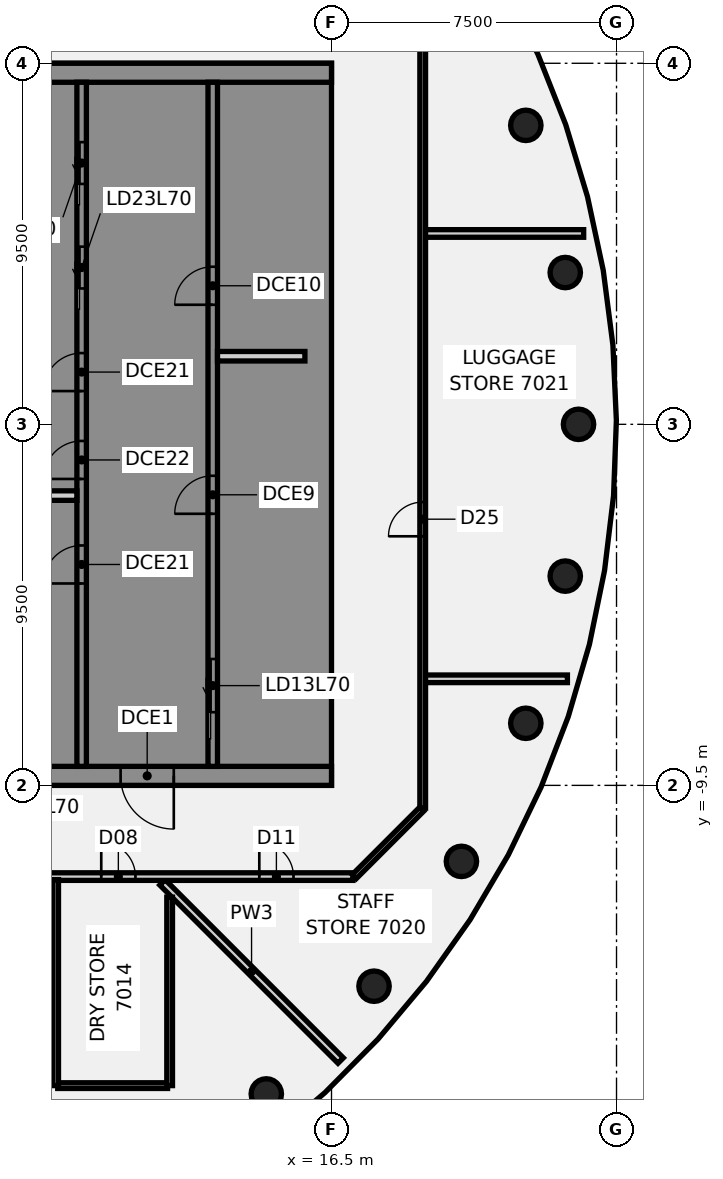
"""IFC4 building model, lengths in metres.
Left out: names, types, materials, properties, quantities, classifications, styles, units other than length and angle.
Written with IfcOpenShell. Run it as: python <this file> out.ifc"""

import sys

from ifc_helpers import new_model, si_unit, direction, frame, frame_2d, origin, origin_2d, place, context, subcontext, project, spatial, polyline, rectangle, circle, outline, extrude, element, fill, save


model = new_model("IFC4")
c1 = context("Model", 3, precision=1e-05, world=origin(), true_north=direction((0.0, 1.0)))
c2 = subcontext(c1, "Body", "Model", "MODEL_VIEW")
j1 = project(units=[si_unit("LENGTHUNIT", "METRE"), si_unit("PLANEANGLEUNIT", "RADIAN")], contexts=[c1])
p1 = place(None, origin())
s1 = spatial("IfcSite", under=j1, at=p1, CompositionType="ELEMENT")
p2 = place(p1, origin())
s2 = spatial("IfcBuilding", under=s1, at=p2, CompositionType="ELEMENT")
p3 = place(p2, frame((0.0, 0.0, 274.8)))
s3 = spatial("IfcBuildingStorey", under=s2, at=p3, CompositionType="ELEMENT", Elevation=274.8)
for number, where, z_axis, x_axis in (
    (1, (23.0, 0.0, -0.14), (0.0, 0.0, 1.0), (1.0, 0.0, 0.0)),
    (2, (22.651, 3.994, -0.14), (0.0, 0.0, 1.0), (1.0, 0.0, 0.0)),
    (3, (21.613, 7.866, -0.14), (0.0, 0.0, 1.0), (1.0, 0.0, 0.0)),
    (4, (14.784, -17.619, -0.14), (0.0, 0.0, 1.0), (1.0, 0.0, 0.0)),
    (5, (17.619, -14.784, -0.14), (0.0, 0.0, 1.0), (1.0, 0.0, 0.0)),
    (6, (19.919, -11.5, -0.14), (0.0, 0.0, 1.0), (1.0, 0.0, 0.0)),
    (7, (21.613, -7.866, -0.14), (0.0, 0.0, 1.0), (1.0, 0.0, 0.0)),
    (8, (22.651, -3.994, -0.14), (0.0, 0.0, 1.0), (1.0, 0.0, 0.0)),
):
    element("IfcColumn", number, at=place(p3, frame(where, z_axis=z_axis, x_axis=x_axis)), inside=s3, PredefinedType="COLUMN", context=c2, shape_type="SweptSolid", body=[
        extrude(circle(Radius=0.4, at=origin_2d()), origin(), (0.0, 0.0, 1.0), 3.56),
    ])
p4 = place(p3, frame((12.052, -12.052, 0.0), z_axis=(0.0, 0.0, 1.0), x_axis=(0.707106781187, -0.707106781187, 0.0)))
e9 = element("IfcWall", 9, at=p4, inside=s3, PredefinedType="PARTITIONING", context=c2, shape_type="SweptSolid", body=[
    extrude(rectangle(XDim=6.631, YDim=0.2, at=frame_2d((3.315, 0.0))), origin(), (0.0, 0.0, 1.0), 2.824),
])
p5 = place(p3, frame((-17.1, -11.9, 0.0), z_axis=(0.0, 0.0, 1.0), x_axis=(1.0, 0.0, 0.0)))
e10 = element("IfcWall", 10, at=p5, inside=s3, PredefinedType="PARTITIONING", context=c2, shape_type="SweptSolid", body=[
    extrude(rectangle(XDim=34.165, YDim=0.2, at=frame_2d((17.083, 0.0))), origin(), (0.0, 0.0, 1.0), 2.824),
])
p6 = place(p5, frame((7.75, 0.0, 0.0)))
e11 = element("IfcOpeningElement", 11, at=p6, cuts=e10, PredefinedType="OPENING", context=c2, shape_type="SweptSolid", body=[
    extrude(rectangle(XDim=0.9, YDim=2.1, at=frame_2d((0.45, 1.05))), frame((0.0, 0.11, 0.0), z_axis=(0.0, -1.0, 0.0), x_axis=(1.0, 0.0, 0.0)), (0.0, 0.0, 1.0), 0.22),
])
p7 = place(p5, frame((27.541, 0.0, 0.0)))
e12 = element("IfcOpeningElement", 12, at=p7, cuts=e10, PredefinedType="OPENING", context=c2, shape_type="SweptSolid", body=[
    extrude(rectangle(XDim=0.9, YDim=2.1, at=frame_2d((0.45, 1.05))), frame((0.0, 0.11, 0.0), z_axis=(0.0, -1.0, 0.0), x_axis=(1.0, 0.0, 0.0)), (0.0, 0.0, 1.0), 0.22),
])
p8 = place(p5, frame((16.809, 0.0, 0.0)))
e13 = element("IfcOpeningElement", 13, at=p8, cuts=e10, PredefinedType="OPENING", context=c2, shape_type="SweptSolid", body=[
    extrude(rectangle(XDim=1.8, YDim=2.1, at=frame_2d((0.9, 1.05))), frame((0.0, 0.11, 0.0), z_axis=(0.0, -1.0, 0.0), x_axis=(1.0, 0.0, 0.0)), (0.0, 0.0, 1.0), 0.22),
])
p9 = place(p5, frame((24.222, 0.0, 0.0)))
e14 = element("IfcOpeningElement", 14, at=p9, cuts=e10, PredefinedType="OPENING", context=c2, shape_type="SweptSolid", body=[
    extrude(rectangle(XDim=0.9, YDim=2.1, at=frame_2d((0.45, 1.05))), frame((0.0, 0.11, 0.0), z_axis=(0.0, -1.0, 0.0), x_axis=(1.0, 0.0, 0.0)), (0.0, 0.0, 1.0), 0.22),
])
p10 = place(p5, frame((31.7, 0.0, 0.0)))
e15 = element("IfcOpeningElement", 15, at=p10, cuts=e10, PredefinedType="OPENING", context=c2, shape_type="SweptSolid", body=[
    extrude(rectangle(XDim=0.9, YDim=2.1, at=frame_2d((0.45, 1.05))), frame((0.0, 0.11, 0.0), z_axis=(0.0, -1.0, 0.0), x_axis=(1.0, 0.0, 0.0)), (0.0, 0.0, 1.0), 0.22),
])
p11 = place(p3, frame((9.296, -17.4, 0.0), z_axis=(0.0, 0.0, 1.0), x_axis=(1.0, 0.0, 0.0)))
e16 = element("IfcWall", 16, at=p11, inside=s3, PredefinedType="PARTITIONING", context=c2, shape_type="SweptSolid", body=[
    extrude(rectangle(XDim=2.89, YDim=0.15, at=frame_2d((1.445, 0.0))), origin(), (0.0, 0.0, 1.0), 2.824),
])
p12 = place(p3, frame((18.955, -6.696, 0.0), z_axis=(0.0, 0.0, 1.0), x_axis=(1.0, 0.0, 0.0)))
e17 = element("IfcWall", 17, at=p12, inside=s3, PredefinedType="PARTITIONING", context=c2, shape_type="SweptSolid", body=[
    extrude(rectangle(XDim=3.753, YDim=0.2, at=frame_2d((1.876, 0.0))), origin(), (0.0, 0.0, 1.0), 2.824),
])
p13 = place(p3, frame((18.955, 5.022, 0.0), z_axis=(0.0, 0.0, 1.0), x_axis=(1.0, 0.0, 0.0)))
e18 = element("IfcWall", 18, at=p13, inside=s3, PredefinedType="PARTITIONING", context=c2, shape_type="SweptSolid", body=[
    extrude(rectangle(XDim=4.181, YDim=0.2, at=frame_2d((2.09, 0.0))), origin(), (0.0, 0.0, 1.0), 2.824),
])
p14 = place(p3, frame((17.1, -11.9, 0.0), z_axis=(0.0, 0.0, 1.0), x_axis=(0.707106781187, 0.707106781187, 0.0)))
e19 = element("IfcWall", 19, at=p14, inside=s3, PredefinedType="PARTITIONING", context=c2, shape_type="SweptSolid", body=[
    extrude(rectangle(XDim=2.505, YDim=0.15, at=frame_2d((1.253, 0.0))), origin(), (0.0, 0.0, 1.0), 2.824),
])
p15 = place(p3, frame((9.241, -17.4, 0.0), z_axis=(0.0, 0.0, 1.0), x_axis=(0.0, 1.0, 0.0)))
e20 = element("IfcWall", 20, at=p15, inside=s3, PredefinedType="PARTITIONING", context=c2, shape_type="SweptSolid", body=[
    extrude(rectangle(XDim=5.42, YDim=0.15, at=frame_2d((2.71, 0.0))), origin(), (0.0, 0.0, 1.0), 2.824),
])
p16 = place(p3, frame((12.241, -17.4, 0.0), z_axis=(0.0, 0.0, 1.0), x_axis=(0.0, 1.0, 0.0)))
e21 = element("IfcWall", 21, at=p16, inside=s3, PredefinedType="PARTITIONING", context=c2, shape_type="SweptSolid", body=[
    extrude(rectangle(XDim=4.959, YDim=0.15, at=frame_2d((2.479, 0.0))), origin(), (0.0, 0.0, 1.0), 2.824),
])
p17 = place(p3, frame((18.9, -10.1, 0.0), z_axis=(0.0, 0.0, 1.0), x_axis=(0.0, 1.0, 0.0)))
e22 = element("IfcWall", 22, at=p17, inside=s3, PredefinedType="PARTITIONING", context=c2, shape_type="SweptSolid", body=[
    extrude(rectangle(XDim=20.2, YDim=0.15, at=frame_2d((10.1, 0.0))), origin(), (0.0, 0.0, 1.0), 2.824),
])
p18 = place(p17, frame((7.154, 0.0, 0.0)))
e23 = element("IfcOpeningElement", 23, at=p18, cuts=e22, PredefinedType="OPENING", context=c2, shape_type="SweptSolid", body=[
    extrude(rectangle(XDim=0.9, YDim=2.1, at=frame_2d((0.45, 1.05))), frame((0.0, 0.085, 0.0), z_axis=(0.0, -1.0, 0.0), x_axis=(1.0, 0.0, 0.0)), (0.0, 0.0, 1.0), 0.17),
])
p19 = place(p3, frame((16.5, -9.25, 0.0), z_axis=(0.0, 0.0, 1.0), x_axis=(-1.0, 0.0, 0.0)))
e24 = element("IfcWall", 24, at=p19, inside=s3, PredefinedType="SHEAR", context=c2, shape_type="SweptSolid", body=[
    extrude(rectangle(XDim=13.0, YDim=0.5, at=frame_2d((6.5, 0.0))), origin(), (0.0, 0.0, 1.0), 3.42),
])
p20 = place(p19, frame((4.15, 0.0, 0.0)))
e25 = element("IfcOpeningElement", 25, at=p20, cuts=e24, PredefinedType="OPENING", context=c2, shape_type="SweptSolid", body=[
    extrude(rectangle(XDim=1.4, YDim=2.1, at=frame_2d((0.7, 1.05))), frame((0.0, 0.26, 0.0), z_axis=(0.0, -1.0, 0.0), x_axis=(1.0, 0.0, 0.0)), (0.0, 0.0, 1.0), 0.52),
])
p21 = place(p19, frame((10.125, 0.0, 0.0)))
e26 = element("IfcOpeningElement", 26, at=p21, cuts=e24, PredefinedType="OPENING", context=c2, shape_type="SweptSolid", body=[
    extrude(rectangle(XDim=1.4, YDim=2.1, at=frame_2d((0.7, 1.05))), frame((0.0, 0.26, 0.0), z_axis=(0.0, -1.0, 0.0), x_axis=(1.0, 0.0, 0.0)), (0.0, 0.0, 1.0), 0.52),
])
p22 = place(p3, origin())
e27 = element("IfcWall", 27, at=p22, inside=s3, PredefinedType="SHEAR", context=c2, shape_type="SweptSolid", body=[
    extrude(outline(polyline([(13.5, -8.125), (13.5, -9.0), (16.0, -9.0), (16.5, -9.0), (16.5, 9.0), (16.0, 9.0), (13.5, 9.0), (13.5, 8.125), (16.0, 8.125), (16.0, 5.625), (13.5, 5.625), (13.5, 5.375), (16.0, 5.375), (16.0, -5.375), (13.5, -5.375), (13.5, -5.625), (16.0, -5.625), (16.0, -8.125), (13.5, -8.125)])), origin(), (0.0, 0.0, 1.0), 3.42),
])
p23 = place(p3, frame((16.5, 9.25, 0.0), z_axis=(0.0, 0.0, 1.0), x_axis=(-1.0, 0.0, 0.0)))
e28 = element("IfcWall", 28, at=p23, inside=s3, PredefinedType="SHEAR", context=c2, shape_type="SweptSolid", body=[
    extrude(rectangle(XDim=13.0, YDim=0.5, at=frame_2d((6.5, 0.0))), origin(), (0.0, 0.0, 1.0), 3.42),
])
p24 = place(p3, origin())
e29 = element("IfcWall", 29, at=p24, inside=s3, PredefinedType="SHEAR", context=c2, shape_type="SweptSolid", body=[
    extrude(outline(polyline([(9.8, -5.375), (7.5, -5.375), (7.5, 2.625), (9.8, 2.625), (9.8, 2.875), (7.5, 2.875), (7.5, 5.375), (9.8, 5.375), (9.8, 5.625), (7.5, 5.625), (7.5, 8.125), (9.8, 8.125), (9.8, 9.0), (7.5, 9.0), (7.25, 9.0), (7.25, -5.625), (7.5, -5.625), (9.8, -5.625), (9.8, -5.375)])), origin(), (0.0, 0.0, 1.0), 3.42),
])
p25 = place(p3, origin())
e30 = element("IfcWall", 30, at=p25, inside=s3, PredefinedType="SHEAR", context=c2, shape_type="SweptSolid", body=[
    extrude(outline(polyline([(7.5, -8.125), (7.5, -9.0), (9.8, -9.0), (9.8, -8.125), (9.8, -5.625), (9.55, -5.625), (9.55, -8.125), (7.5, -8.125)])), origin(), (0.0, 0.0, 1.0), 3.42),
])
p26 = place(p3, frame((13.375, -9.0, 0.0), z_axis=(0.0, 0.0, 1.0), x_axis=(0.0, 1.0, 0.0)))
e31 = element("IfcWall", 31, at=p26, inside=s3, PredefinedType="SHEAR", context=c2, shape_type="SweptSolid", body=[
    extrude(rectangle(XDim=18.0, YDim=0.25, at=frame_2d((9.0, 0.0))), origin(), (0.0, 0.0, 1.0), 3.42),
])
p27 = place(p26, frame((1.425, 0.0, 0.0)))
e32 = element("IfcOpeningElement", 32, at=p27, cuts=e31, PredefinedType="OPENING", context=c2, shape_type="SweptSolid", body=[
    extrude(rectangle(XDim=1.4, YDim=2.1, at=frame_2d((0.7, 1.05))), frame((0.0, 0.135, 0.0), z_axis=(0.0, -1.0, 0.0), x_axis=(1.0, 0.0, 0.0)), (0.0, 0.0, 1.0), 0.27),
])
p28 = place(p26, frame((6.646, 0.0, 0.0)))
e33 = element("IfcOpeningElement", 33, at=p28, cuts=e31, PredefinedType="OPENING", context=c2, shape_type="SweptSolid", body=[
    extrude(rectangle(XDim=1.0, YDim=2.1, at=frame_2d((0.5, 1.05))), frame((0.0, 0.135, 0.0), z_axis=(0.0, -1.0, 0.0), x_axis=(1.0, 0.0, 0.0)), (0.0, 0.0, 1.0), 0.27),
])
p29 = place(p26, frame((12.146, 0.0, 0.0)))
e34 = element("IfcOpeningElement", 34, at=p29, cuts=e31, PredefinedType="OPENING", context=c2, shape_type="SweptSolid", body=[
    extrude(rectangle(XDim=1.0, YDim=2.1, at=frame_2d((0.5, 1.05))), frame((0.0, 0.135, 0.0), z_axis=(0.0, -1.0, 0.0), x_axis=(1.0, 0.0, 0.0)), (0.0, 0.0, 1.0), 0.27),
])
p30 = place(p3, frame((9.925, -9.0, 0.0), z_axis=(0.0, 0.0, 1.0), x_axis=(0.0, 1.0, 0.0)))
e35 = element("IfcWall", 35, at=p30, inside=s3, PredefinedType="SHEAR", context=c2, shape_type="SweptSolid", body=[
    extrude(rectangle(XDim=18.0, YDim=0.25, at=frame_2d((9.0, 0.0))), origin(), (0.0, 0.0, 1.0), 3.42),
])
p31 = place(p30, frame((12.575, 0.0, 0.0)))
e36 = element("IfcOpeningElement", 36, at=p31, cuts=e35, PredefinedType="OPENING", context=c2, shape_type="SweptSolid", body=[
    extrude(rectangle(XDim=1.1, YDim=2.1, at=frame_2d((0.55, 1.05))), frame((0.0, 0.135, 0.0), z_axis=(0.0, -1.0, 0.0), x_axis=(1.0, 0.0, 0.0)), (0.0, 0.0, 1.0), 0.27),
])
p32 = place(p30, frame((15.325, 0.0, 0.0)))
e37 = element("IfcOpeningElement", 37, at=p32, cuts=e35, PredefinedType="OPENING", context=c2, shape_type="SweptSolid", body=[
    extrude(rectangle(XDim=1.1, YDim=2.1, at=frame_2d((0.55, 1.05))), frame((0.0, 0.135, 0.0), z_axis=(0.0, -1.0, 0.0), x_axis=(1.0, 0.0, 0.0)), (0.0, 0.0, 1.0), 0.27),
])
p33 = place(p30, frame((4.812, 0.0, 0.0)))
e38 = element("IfcOpeningElement", 38, at=p33, cuts=e35, PredefinedType="OPENING", context=c2, shape_type="SweptSolid", body=[
    extrude(rectangle(XDim=1.0, YDim=2.1, at=frame_2d((0.5, 1.05))), frame((0.0, 0.135, 0.0), z_axis=(0.0, -1.0, 0.0), x_axis=(1.0, 0.0, 0.0)), (0.0, 0.0, 1.0), 0.27),
])
p34 = place(p30, frame((7.562, 0.0, 0.0)))
e39 = element("IfcOpeningElement", 39, at=p34, cuts=e35, PredefinedType="OPENING", context=c2, shape_type="SweptSolid", body=[
    extrude(rectangle(XDim=1.0, YDim=2.1, at=frame_2d((0.5, 1.05))), frame((0.0, 0.135, 0.0), z_axis=(0.0, -1.0, 0.0), x_axis=(1.0, 0.0, 0.0)), (0.0, 0.0, 1.0), 0.27),
])
p35 = place(p30, frame((9.875, 0.0, 0.0)))
e40 = element("IfcOpeningElement", 40, at=p35, cuts=e35, PredefinedType="OPENING", context=c2, shape_type="SweptSolid", body=[
    extrude(rectangle(XDim=1.0, YDim=2.1, at=frame_2d((0.5, 1.05))), frame((0.0, 0.135, 0.0), z_axis=(0.0, -1.0, 0.0), x_axis=(1.0, 0.0, 0.0)), (0.0, 0.0, 1.0), 0.27),
])
for number, where, z_axis, x_axis in (
    (41, (15.8, 1.792, 0.0), (0.0, 0.0, 1.0), (-1.0, 0.0, 0.0)),
    (42, (9.8, -1.875, 0.0), (0.0, 0.0, 1.0), (-1.0, 0.0, 0.0)),
):
    element("IfcWall", number, at=place(p3, frame(where, z_axis=z_axis, x_axis=x_axis)), inside=s3, PredefinedType="PARTITIONING", context=c2, shape_type="SweptSolid", body=[
        extrude(rectangle(XDim=2.3, YDim=0.25, at=frame_2d((1.15, 0.0))), origin(), (0.0, 0.0, 1.0), 3.42),
    ])
p36 = place(p7, frame((0.9, 0.0, 0.0), z_axis=(0.0, 0.0, 1.0), x_axis=(-1.0, 0.0, 0.0)))
e43 = element("IfcDoor", 43, at=p36, inside=s3, OperationType="SINGLE_SWING_RIGHT", PredefinedType="DOOR", context=c2, shape_type="SweptSolid", body=[
    extrude(rectangle(XDim=0.9, YDim=2.1, at=frame_2d((0.45, 1.05))), frame((0.0, 0.025, 0.0), z_axis=(0.0, -1.0, 0.0), x_axis=(1.0, 0.0, 0.0)), (0.0, 0.0, 1.0), 0.05),
])
fill(e12, e43)
p37 = place(p10, frame((0.9, 0.0, 0.0), z_axis=(0.0, 0.0, 1.0), x_axis=(-1.0, 0.0, 0.0)))
e44 = element("IfcDoor", 44, at=p37, inside=s3, OperationType="SINGLE_SWING_RIGHT", PredefinedType="DOOR", context=c2, shape_type="SweptSolid", body=[
    extrude(rectangle(XDim=0.9, YDim=2.1, at=frame_2d((0.45, 1.05))), frame((0.0, 0.025, 0.0), z_axis=(0.0, -1.0, 0.0), x_axis=(1.0, 0.0, 0.0)), (0.0, 0.0, 1.0), 0.05),
])
fill(e15, e44)
p38 = place(p18, frame((0.9, 0.0, 0.0), z_axis=(0.0, 0.0, 1.0), x_axis=(-1.0, 0.0, 0.0)))
e45 = element("IfcDoor", 45, at=p38, inside=s3, OperationType="SINGLE_SWING_LEFT", PredefinedType="DOOR", context=c2, shape_type="SweptSolid", body=[
    extrude(rectangle(XDim=0.9, YDim=2.1, at=frame_2d((0.45, 1.05))), frame((0.0, 0.025, 0.0), z_axis=(0.0, -1.0, 0.0), x_axis=(1.0, 0.0, 0.0)), (0.0, 0.0, 1.0), 0.05),
])
fill(e23, e45)
p39 = place(p20, origin())
e46 = element("IfcDoor", 46, at=p39, inside=s3, OperationType="SINGLE_SWING_LEFT", PredefinedType="DOOR", context=c2, shape_type="SweptSolid", body=[
    extrude(rectangle(XDim=1.4, YDim=2.1, at=frame_2d((0.7, 1.05))), frame((0.0, 0.025, 0.0), z_axis=(0.0, -1.0, 0.0), x_axis=(1.0, 0.0, 0.0)), (0.0, 0.0, 1.0), 0.05),
])
fill(e25, e46)
p40 = place(p27, origin())
e47 = element("IfcDoor", 47, at=p40, inside=s3, OperationType="SLIDING_TO_LEFT", PredefinedType="DOOR", context=c2, shape_type="SweptSolid", body=[
    extrude(rectangle(XDim=1.4, YDim=2.1, at=frame_2d((0.7, 1.05))), frame((0.0, 0.025, 0.0), z_axis=(0.0, -1.0, 0.0), x_axis=(1.0, 0.0, 0.0)), (0.0, 0.0, 1.0), 0.05),
])
fill(e32, e47)
p41 = place(p31, origin())
e48 = element("IfcDoor", 48, at=p41, inside=s3, OperationType="SLIDING_TO_LEFT", PredefinedType="DOOR", context=c2, shape_type="SweptSolid", body=[
    extrude(rectangle(XDim=1.1, YDim=2.1, at=frame_2d((0.55, 1.05))), frame((0.0, 0.025, 0.0), z_axis=(0.0, -1.0, 0.0), x_axis=(1.0, 0.0, 0.0)), (0.0, 0.0, 1.0), 0.05),
])
fill(e36, e48)
p42 = place(p32, origin())
e49 = element("IfcDoor", 49, at=p42, inside=s3, OperationType="SLIDING_TO_LEFT", PredefinedType="DOOR", context=c2, shape_type="SweptSolid", body=[
    extrude(rectangle(XDim=1.1, YDim=2.1, at=frame_2d((0.55, 1.05))), frame((0.0, 0.025, 0.0), z_axis=(0.0, -1.0, 0.0), x_axis=(1.0, 0.0, 0.0)), (0.0, 0.0, 1.0), 0.05),
])
fill(e37, e49)
p43 = place(p28, origin())
e50 = element("IfcDoor", 50, at=p43, inside=s3, OperationType="SINGLE_SWING_LEFT", PredefinedType="DOOR", context=c2, shape_type="SweptSolid", body=[
    extrude(rectangle(XDim=1.0, YDim=2.1, at=frame_2d((0.5, 1.05))), frame((0.0, 0.025, 0.0), z_axis=(0.0, -1.0, 0.0), x_axis=(1.0, 0.0, 0.0)), (0.0, 0.0, 1.0), 0.05),
])
fill(e33, e50)
p44 = place(p29, origin())
e51 = element("IfcDoor", 51, at=p44, inside=s3, OperationType="SINGLE_SWING_LEFT", PredefinedType="DOOR", context=c2, shape_type="SweptSolid", body=[
    extrude(rectangle(XDim=1.0, YDim=2.1, at=frame_2d((0.5, 1.05))), frame((0.0, 0.025, 0.0), z_axis=(0.0, -1.0, 0.0), x_axis=(1.0, 0.0, 0.0)), (0.0, 0.0, 1.0), 0.05),
])
fill(e34, e51)
p45 = place(p33, origin())
e52 = element("IfcDoor", 52, at=p45, inside=s3, OperationType="SINGLE_SWING_LEFT", PredefinedType="DOOR", context=c2, shape_type="SweptSolid", body=[
    extrude(rectangle(XDim=1.0, YDim=2.1, at=frame_2d((0.5, 1.05))), frame((0.0, 0.025, 0.0), z_axis=(0.0, -1.0, 0.0), x_axis=(1.0, 0.0, 0.0)), (0.0, 0.0, 1.0), 0.05),
])
fill(e38, e52)
p46 = place(p34, origin())
e53 = element("IfcDoor", 53, at=p46, inside=s3, OperationType="SINGLE_SWING_LEFT", PredefinedType="DOOR", context=c2, shape_type="SweptSolid", body=[
    extrude(rectangle(XDim=1.0, YDim=2.1, at=frame_2d((0.5, 1.05))), frame((0.0, 0.025, 0.0), z_axis=(0.0, -1.0, 0.0), x_axis=(1.0, 0.0, 0.0)), (0.0, 0.0, 1.0), 0.05),
])
fill(e39, e53)
p47 = place(p35, origin())
e54 = element("IfcDoor", 54, at=p47, inside=s3, OperationType="SINGLE_SWING_LEFT", PredefinedType="DOOR", context=c2, shape_type="SweptSolid", body=[
    extrude(rectangle(XDim=1.0, YDim=2.1, at=frame_2d((0.5, 1.05))), frame((0.0, 0.025, 0.0), z_axis=(0.0, -1.0, 0.0), x_axis=(1.0, 0.0, 0.0)), (0.0, 0.0, 1.0), 0.05),
])
fill(e40, e54)
save(model, sys.argv[1])
